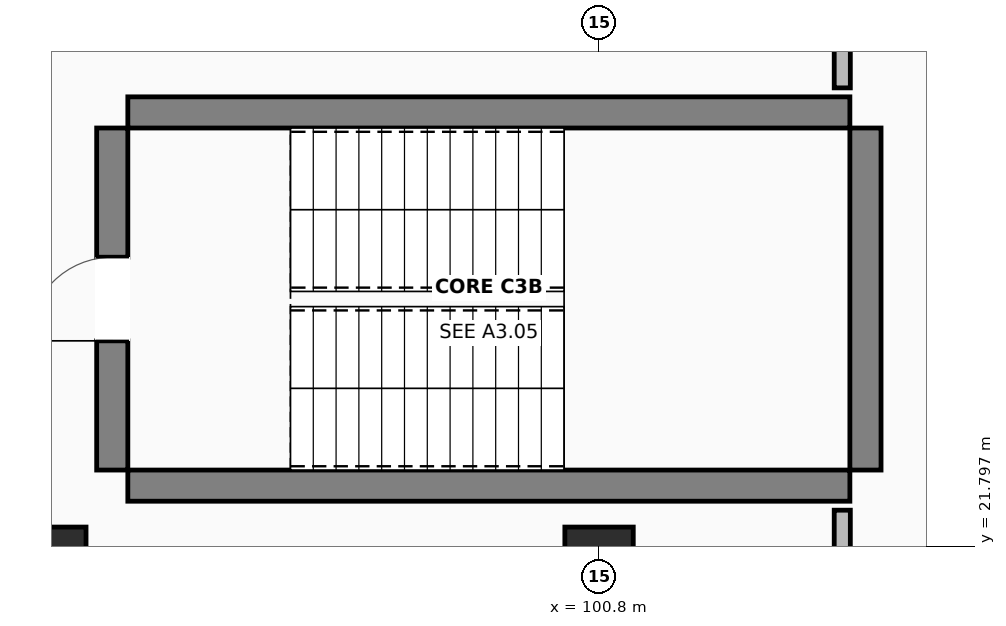
"""IFC4 building model, lengths in metres.
Left out: names, types, materials, properties, quantities, classifications, styles, units other than length and angle.
Written with IfcOpenShell. Run it as: python <this file> out.ifc"""

import sys

from ifc_helpers import new_model, si_unit, direction, frame, frame_2d, origin, origin_2d, place, context, subcontext, project, spatial, rectangle, extrude, element, fill, save


model = new_model("IFC4")
c1 = context("Model", 3, precision=1e-05, world=origin(), true_north=direction((0.0, 1.0)))
c2 = subcontext(c1, "Body", "Model", "MODEL_VIEW")
j1 = project(units=[si_unit("LENGTHUNIT", "METRE"), si_unit("PLANEANGLEUNIT", "RADIAN")], contexts=[c1])
p1 = place(None, origin())
s1 = spatial("IfcSite", under=j1, at=p1, CompositionType="ELEMENT")
p2 = place(p1, origin())
s2 = spatial("IfcBuilding", under=s1, at=p2, CompositionType="ELEMENT")
p3 = place(p2, frame((0.0, 0.0, 4.5)))
s3 = spatial("IfcBuildingStorey", under=s2, at=p3, CompositionType="ELEMENT", Elevation=4.5)
for number, where, z_axis, x_axis in (
    (1, (93.6, 21.6, 0.0), (0.0, 0.0, 1.0), (1.0, 0.0, 0.0)),
    (2, (100.8, 21.6, 0.0), (0.0, 0.0, 1.0), (1.0, 0.0, 0.0)),
):
    element("IfcColumn", number, at=place(p3, frame(where, z_axis=z_axis, x_axis=x_axis)), inside=s3, PredefinedType="COLUMN", context=c2, shape_type="SweptSolid", body=[
        extrude(rectangle(XDim=0.9, YDim=0.9, at=origin_2d()), origin(), (0.0, 0.0, 1.0), 4.22),
    ])
for number, where, z_axis, x_axis in (
    (3, (94.6, 22.595, 0.0), (0.0, 0.0, 1.0), (1.0, 0.0, 0.0)),
    (4, (94.6, 27.505, 0.0), (0.0, 0.0, 1.0), (1.0, 0.0, 0.0)),
):
    element("IfcWall", number, at=place(p3, frame(where, z_axis=z_axis, x_axis=x_axis)), inside=s3, PredefinedType="SHEAR", context=c2, shape_type="SweptSolid", body=[
        extrude(rectangle(XDim=9.5, YDim=0.41, at=frame_2d((4.75, 0.0))), origin(), (0.0, 0.0, 1.0), 4.22),
    ])
p4 = place(p3, frame((94.395, 22.8, 0.0), z_axis=(0.0, 0.0, 1.0), x_axis=(0.0, 1.0, 0.0)))
e5 = element("IfcWall", 5, at=p4, inside=s3, PredefinedType="SHEAR", context=c2, shape_type="SweptSolid", body=[
    extrude(rectangle(XDim=4.5, YDim=0.41, at=frame_2d((2.25, 0.0))), origin(), (0.0, 0.0, 1.0), 4.22),
])
p5 = place(p4, frame((1.7, 0.0, 0.0)))
e6 = element("IfcOpeningElement", 6, at=p5, cuts=e5, PredefinedType="OPENING", context=c2, shape_type="SweptSolid", body=[
    extrude(rectangle(XDim=1.1, YDim=2.15, at=frame_2d((0.55, 1.075))), frame((0.0, 0.215, 0.0), z_axis=(0.0, -1.0, 0.0), x_axis=(1.0, 0.0, 0.0)), (0.0, 0.0, 1.0), 0.43),
])
p6 = place(p3, frame((104.305, 22.8, 0.0), z_axis=(0.0, 0.0, 1.0), x_axis=(0.0, 1.0, 0.0)))
e7 = element("IfcWall", 7, at=p6, inside=s3, PredefinedType="SHEAR", context=c2, shape_type="SweptSolid", body=[
    extrude(rectangle(XDim=4.5, YDim=0.41, at=frame_2d((2.25, 0.0))), origin(), (0.0, 0.0, 1.0), 4.22),
])
p7 = place(p3, frame((104.0, 20.802, 0.0), z_axis=(0.0, 0.0, 1.0), x_axis=(0.0, 1.0, 0.0)))
e8 = element("IfcWall", 8, at=p7, inside=s3, PredefinedType="PARTITIONING", context=c2, shape_type="SweptSolid", body=[
    extrude(rectangle(XDim=1.47, YDim=0.212, at=frame_2d((0.735, 0.0))), origin(), (0.0, 0.0, 1.0), 3.26),
])
p8 = place(p3, frame((104.0, 27.828, 0.0), z_axis=(0.0, 0.0, 1.0), x_axis=(0.0, 1.0, 0.0)))
e9 = element("IfcWall", 9, at=p8, inside=s3, PredefinedType="PARTITIONING", context=c2, shape_type="SweptSolid", body=[
    extrude(rectangle(XDim=2.352, YDim=0.212, at=frame_2d((1.176, 0.0))), origin(), (0.0, 0.0, 1.0), 3.26),
])
p9 = place(p5, origin())
e10 = element("IfcDoor", 10, at=p9, inside=s3, OperationType="SINGLE_SWING_LEFT", PredefinedType="DOOR", context=c2, shape_type="SweptSolid", body=[
    extrude(rectangle(XDim=1.1, YDim=2.15, at=frame_2d((0.55, 1.075))), frame((0.0, 0.025, 0.0), z_axis=(0.0, -1.0, 0.0), x_axis=(1.0, 0.0, 0.0)), (0.0, 0.0, 1.0), 0.05),
])
fill(e6, e10)
save(model, sys.argv[1])
